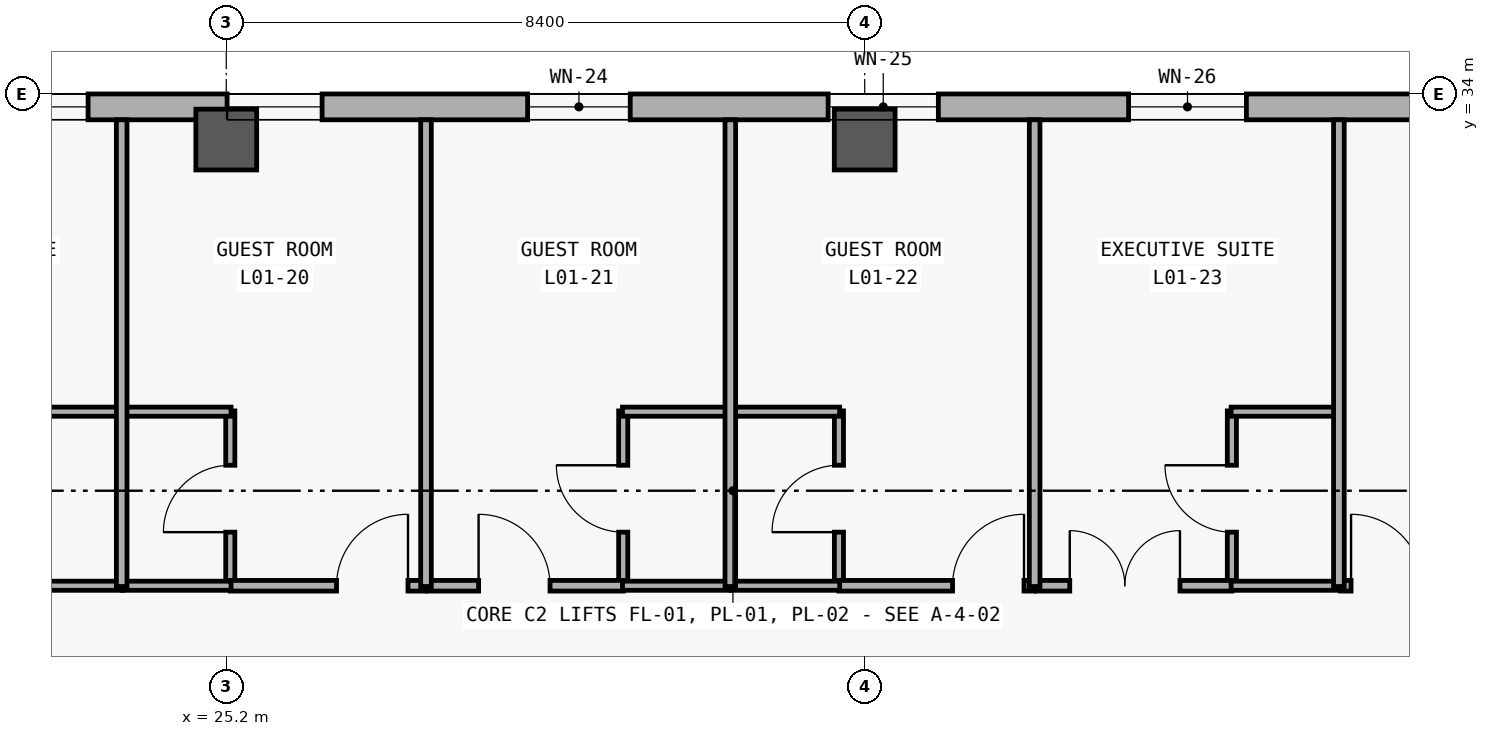
"""IFC4 building model, lengths in metres.
Left out: names, types, materials, properties, quantities, classifications, styles, units other than length and angle.
Written with IfcOpenShell. Run it as: python <this file> out.ifc"""

import sys

from ifc_helpers import new_model, si_unit, direction, frame, frame_2d, origin, origin_2d, place, context, subcontext, project, spatial, rectangle, extrude, element, fill, save


model = new_model("IFC4")
c1 = context("Model", 3, precision=1e-05, world=origin(), true_north=direction((0.0, 1.0)))
c2 = subcontext(c1, "Body", "Model", "MODEL_VIEW")
j1 = project(units=[si_unit("LENGTHUNIT", "METRE"), si_unit("PLANEANGLEUNIT", "RADIAN")], contexts=[c1])
p1 = place(None, origin())
s1 = spatial("IfcSite", under=j1, at=p1, CompositionType="ELEMENT")
p2 = place(p1, origin())
s2 = spatial("IfcBuilding", under=s1, at=p2, CompositionType="ELEMENT")
p3 = place(p2, frame((0.0, 0.0, 5.4)))
s3 = spatial("IfcBuildingStorey", under=s2, at=p3, CompositionType="ELEMENT", Elevation=5.4)
for number, where, z_axis, x_axis in (
    (1, (25.2, 33.4, 0.0), (0.0, 0.0, 1.0), (1.0, 0.0, 0.0)),
    (2, (33.6, 33.4, 0.0), (0.0, 0.0, 1.0), (1.0, 0.0, 0.0)),
):
    element("IfcColumn", number, at=place(p3, frame(where, z_axis=z_axis, x_axis=x_axis)), inside=s3, PredefinedType="COLUMN", context=c2, shape_type="SweptSolid", body=[
        extrude(rectangle(XDim=0.8, YDim=0.8, at=origin_2d()), origin(), (0.0, 0.0, 1.0), 5.4),
    ])
p4 = place(p3, frame((8.74, 33.83, 0.0), z_axis=(0.0, 0.0, 1.0), x_axis=(1.0, 0.0, 0.0)))
e3 = element("IfcWall", 3, at=p4, inside=s3, PredefinedType="SOLIDWALL", context=c2, shape_type="SweptSolid", body=[
    extrude(rectangle(XDim=83.32, YDim=0.34, at=frame_2d((41.66, 0.0))), origin(), (0.0, 0.0, 1.0), 5.1),
])
p5 = place(p4, frame((4.795, 0.0, 0.85)))
e4 = element("IfcOpeningElement", 4, at=p5, cuts=e3, PredefinedType="OPENING", context=c2, shape_type="SweptSolid", body=[
    extrude(rectangle(XDim=1.58, YDim=1.85, at=frame_2d((0.79, 0.925))), frame((0.0, 0.18, 0.0), z_axis=(0.0, -1.0, 0.0), x_axis=(1.0, 0.0, 0.0)), (0.0, 0.0, 1.0), 0.36),
])
p6 = place(p4, frame((11.542, 0.0, 0.85)))
e5 = element("IfcOpeningElement", 5, at=p6, cuts=e3, PredefinedType="OPENING", context=c2, shape_type="SweptSolid", body=[
    extrude(rectangle(XDim=3.1, YDim=2.2, at=frame_2d((1.55, 1.1))), frame((0.0, 0.18, 0.0), z_axis=(0.0, -1.0, 0.0), x_axis=(1.0, 0.0, 0.0)), (0.0, 0.0, 1.0), 0.36),
])
p7 = place(p4, frame((16.471, 0.0, 0.85)))
e6 = element("IfcOpeningElement", 6, at=p7, cuts=e3, PredefinedType="OPENING", context=c2, shape_type="SweptSolid", body=[
    extrude(rectangle(XDim=1.25, YDim=1.45, at=frame_2d((0.625, 0.725))), frame((0.0, 0.18, 0.0), z_axis=(0.0, -1.0, 0.0), x_axis=(1.0, 0.0, 0.0)), (0.0, 0.0, 1.0), 0.36),
])
p8 = place(p4, frame((20.425, 0.0, 0.85)))
e7 = element("IfcOpeningElement", 7, at=p8, cuts=e3, PredefinedType="OPENING", context=c2, shape_type="SweptSolid", body=[
    extrude(rectangle(XDim=1.35, YDim=1.55, at=frame_2d((0.675, 0.775))), frame((0.0, 0.18, 0.0), z_axis=(0.0, -1.0, 0.0), x_axis=(1.0, 0.0, 0.0)), (0.0, 0.0, 1.0), 0.36),
])
p9 = place(p4, frame((24.379, 0.0, 0.85)))
e8 = element("IfcOpeningElement", 8, at=p9, cuts=e3, PredefinedType="OPENING", context=c2, shape_type="SweptSolid", body=[
    extrude(rectangle(XDim=1.45, YDim=1.65, at=frame_2d((0.725, 0.825))), frame((0.0, 0.18, 0.0), z_axis=(0.0, -1.0, 0.0), x_axis=(1.0, 0.0, 0.0)), (0.0, 0.0, 1.0), 0.36),
])
p10 = place(p4, frame((28.332, 0.0, 0.85)))
e9 = element("IfcOpeningElement", 9, at=p10, cuts=e3, PredefinedType="OPENING", context=c2, shape_type="SweptSolid", body=[
    extrude(rectangle(XDim=1.55, YDim=1.65, at=frame_2d((0.775, 0.825))), frame((0.0, 0.18, 0.0), z_axis=(0.0, -1.0, 0.0), x_axis=(1.0, 0.0, 0.0)), (0.0, 0.0, 1.0), 0.36),
])
p11 = place(p4, frame((32.261, 0.0, 0.85)))
e10 = element("IfcOpeningElement", 10, at=p11, cuts=e3, PredefinedType="OPENING", context=c2, shape_type="SweptSolid", body=[
    extrude(rectangle(XDim=1.7, YDim=2.0, at=frame_2d((0.85, 1.0))), frame((0.0, 0.18, 0.0), z_axis=(0.0, -1.0, 0.0), x_axis=(1.0, 0.0, 0.0)), (0.0, 0.0, 1.0), 0.36),
])
p12 = place(p4, frame((35.965, 0.0, 0.85)))
e11 = element("IfcOpeningElement", 11, at=p12, cuts=e3, PredefinedType="OPENING", context=c2, shape_type="SweptSolid", body=[
    extrude(rectangle(XDim=2.3, YDim=2.05, at=frame_2d((1.15, 1.025))), frame((0.0, 0.18, 0.0), z_axis=(0.0, -1.0, 0.0), x_axis=(1.0, 0.0, 0.0)), (0.0, 0.0, 1.0), 0.36),
])
p13 = place(p4, frame((39.744, 0.0, 0.85)))
e12 = element("IfcOpeningElement", 12, at=p13, cuts=e3, PredefinedType="OPENING", context=c2, shape_type="SweptSolid", body=[
    extrude(rectangle(XDim=2.75, YDim=2.1, at=frame_2d((1.375, 1.05))), frame((0.0, 0.18, 0.0), z_axis=(0.0, -1.0, 0.0), x_axis=(1.0, 0.0, 0.0)), (0.0, 0.0, 1.0), 0.36),
])
p14 = place(p4, frame((44.533, 0.0, 0.85)))
e13 = element("IfcOpeningElement", 13, at=p14, cuts=e3, PredefinedType="OPENING", context=c2, shape_type="SweptSolid", body=[
    extrude(rectangle(XDim=1.18, YDim=1.5, at=frame_2d((0.59, 0.75))), frame((0.0, 0.18, 0.0), z_axis=(0.0, -1.0, 0.0), x_axis=(1.0, 0.0, 0.0)), (0.0, 0.0, 1.0), 0.36),
])
p15 = place(p4, frame((48.487, 0.0, 0.85)))
e14 = element("IfcOpeningElement", 14, at=p15, cuts=e3, PredefinedType="OPENING", context=c2, shape_type="SweptSolid", body=[
    extrude(rectangle(XDim=1.28, YDim=1.6, at=frame_2d((0.64, 0.8))), frame((0.0, 0.18, 0.0), z_axis=(0.0, -1.0, 0.0), x_axis=(1.0, 0.0, 0.0)), (0.0, 0.0, 1.0), 0.36),
])
p16 = place(p4, frame((52.441, 0.0, 0.85)))
e15 = element("IfcOpeningElement", 15, at=p16, cuts=e3, PredefinedType="OPENING", context=c2, shape_type="SweptSolid", body=[
    extrude(rectangle(XDim=1.38, YDim=1.7, at=frame_2d((0.69, 0.85))), frame((0.0, 0.18, 0.0), z_axis=(0.0, -1.0, 0.0), x_axis=(1.0, 0.0, 0.0)), (0.0, 0.0, 1.0), 0.36),
])
p17 = place(p4, frame((56.395, 0.0, 0.85)))
e16 = element("IfcOpeningElement", 16, at=p17, cuts=e3, PredefinedType="OPENING", context=c2, shape_type="SweptSolid", body=[
    extrude(rectangle(XDim=1.48, YDim=1.8, at=frame_2d((0.74, 0.9))), frame((0.0, 0.18, 0.0), z_axis=(0.0, -1.0, 0.0), x_axis=(1.0, 0.0, 0.0)), (0.0, 0.0, 1.0), 0.36),
])
p18 = place(p4, frame((60.349, 0.0, 0.85)))
e17 = element("IfcOpeningElement", 17, at=p18, cuts=e3, PredefinedType="OPENING", context=c2, shape_type="SweptSolid", body=[
    extrude(rectangle(XDim=1.58, YDim=1.85, at=frame_2d((0.79, 0.925))), frame((0.0, 0.18, 0.0), z_axis=(0.0, -1.0, 0.0), x_axis=(1.0, 0.0, 0.0)), (0.0, 0.0, 1.0), 0.36),
])
p19 = place(p4, frame((64.302, 0.0, 0.85)))
e18 = element("IfcOpeningElement", 18, at=p19, cuts=e3, PredefinedType="OPENING", context=c2, shape_type="SweptSolid", body=[
    extrude(rectangle(XDim=1.68, YDim=1.9, at=frame_2d((0.84, 0.95))), frame((0.0, 0.18, 0.0), z_axis=(0.0, -1.0, 0.0), x_axis=(1.0, 0.0, 0.0)), (0.0, 0.0, 1.0), 0.36),
])
p20 = place(p4, frame((68.256, 0.0, 0.85)))
e19 = element("IfcOpeningElement", 19, at=p20, cuts=e3, PredefinedType="OPENING", context=c2, shape_type="SweptSolid", body=[
    extrude(rectangle(XDim=1.78, YDim=1.95, at=frame_2d((0.89, 0.975))), frame((0.0, 0.18, 0.0), z_axis=(0.0, -1.0, 0.0), x_axis=(1.0, 0.0, 0.0)), (0.0, 0.0, 1.0), 0.36),
])
p21 = place(p4, frame((72.21, 0.0, 0.85)))
e20 = element("IfcOpeningElement", 20, at=p21, cuts=e3, PredefinedType="OPENING", context=c2, shape_type="SweptSolid", body=[
    extrude(rectangle(XDim=1.88, YDim=1.95, at=frame_2d((0.94, 0.975))), frame((0.0, 0.18, 0.0), z_axis=(0.0, -1.0, 0.0), x_axis=(1.0, 0.0, 0.0)), (0.0, 0.0, 1.0), 0.36),
])
p22 = place(p4, frame((76.129, 0.0, 0.85)))
e21 = element("IfcOpeningElement", 21, at=p22, cuts=e3, PredefinedType="OPENING", context=c2, shape_type="SweptSolid", body=[
    extrude(rectangle(XDim=2.05, YDim=1.95, at=frame_2d((1.025, 0.975))), frame((0.0, 0.18, 0.0), z_axis=(0.0, -1.0, 0.0), x_axis=(1.0, 0.0, 0.0)), (0.0, 0.0, 1.0), 0.36),
])
p23 = place(p4, frame((80.068, 0.0, 0.85)))
e22 = element("IfcOpeningElement", 22, at=p23, cuts=e3, PredefinedType="OPENING", context=c2, shape_type="SweptSolid", body=[
    extrude(rectangle(XDim=2.18, YDim=1.95, at=frame_2d((1.09, 0.975))), frame((0.0, 0.18, 0.0), z_axis=(0.0, -1.0, 0.0), x_axis=(1.0, 0.0, 0.0)), (0.0, 0.0, 1.0), 0.36),
])
p24 = place(p3, frame((25.253, 27.52, 0.0), z_axis=(0.0, 0.0, 1.0), x_axis=(0.0, 1.0, 0.0)))
e23 = element("IfcWall", 23, at=p24, inside=s3, PredefinedType="PARTITIONING", context=c2, shape_type="SweptSolid", body=[
    extrude(rectangle(XDim=2.31, YDim=0.12, at=frame_2d((1.155, 0.0))), origin(), (0.0, 0.0, 1.0), 4.18),
])
p25 = place(p24, frame((0.715, 0.0, 0.0)))
e24 = element("IfcOpeningElement", 24, at=p25, cuts=e23, PredefinedType="OPENING", context=c2, shape_type="SweptSolid", body=[
    extrude(rectangle(XDim=0.88, YDim=2.15, at=frame_2d((0.44, 1.075))), frame((0.0, 0.07, 0.0), z_axis=(0.0, -1.0, 0.0), x_axis=(1.0, 0.0, 0.0)), (0.0, 0.0, 1.0), 0.14),
])
p26 = place(p3, frame((30.423, 27.52, 0.0), z_axis=(0.0, 0.0, 1.0), x_axis=(0.0, 1.0, 0.0)))
e25 = element("IfcWall", 25, at=p26, inside=s3, PredefinedType="PARTITIONING", context=c2, shape_type="SweptSolid", body=[
    extrude(rectangle(XDim=2.31, YDim=0.12, at=frame_2d((1.155, 0.0))), origin(), (0.0, 0.0, 1.0), 4.18),
])
p27 = place(p26, frame((0.715, 0.0, 0.0)))
e26 = element("IfcOpeningElement", 26, at=p27, cuts=e25, PredefinedType="OPENING", context=c2, shape_type="SweptSolid", body=[
    extrude(rectangle(XDim=0.88, YDim=2.15, at=frame_2d((0.44, 1.075))), frame((0.0, 0.07, 0.0), z_axis=(0.0, -1.0, 0.0), x_axis=(1.0, 0.0, 0.0)), (0.0, 0.0, 1.0), 0.14),
])
p28 = place(p3, frame((33.261, 27.52, 0.0), z_axis=(0.0, 0.0, 1.0), x_axis=(0.0, 1.0, 0.0)))
e27 = element("IfcWall", 27, at=p28, inside=s3, PredefinedType="PARTITIONING", context=c2, shape_type="SweptSolid", body=[
    extrude(rectangle(XDim=2.31, YDim=0.12, at=frame_2d((1.155, 0.0))), origin(), (0.0, 0.0, 1.0), 4.18),
])
p29 = place(p28, frame((0.715, 0.0, 0.0)))
e28 = element("IfcOpeningElement", 28, at=p29, cuts=e27, PredefinedType="OPENING", context=c2, shape_type="SweptSolid", body=[
    extrude(rectangle(XDim=0.88, YDim=2.15, at=frame_2d((0.44, 1.075))), frame((0.0, 0.07, 0.0), z_axis=(0.0, -1.0, 0.0), x_axis=(1.0, 0.0, 0.0)), (0.0, 0.0, 1.0), 0.14),
])
p30 = place(p3, frame((38.431, 27.52, 0.0), z_axis=(0.0, 0.0, 1.0), x_axis=(0.0, 1.0, 0.0)))
e29 = element("IfcWall", 29, at=p30, inside=s3, PredefinedType="PARTITIONING", context=c2, shape_type="SweptSolid", body=[
    extrude(rectangle(XDim=2.31, YDim=0.12, at=frame_2d((1.155, 0.0))), origin(), (0.0, 0.0, 1.0), 4.18),
])
p31 = place(p30, frame((0.715, 0.0, 0.0)))
e30 = element("IfcOpeningElement", 30, at=p31, cuts=e29, PredefinedType="OPENING", context=c2, shape_type="SweptSolid", body=[
    extrude(rectangle(XDim=0.88, YDim=2.15, at=frame_2d((0.44, 1.075))), frame((0.0, 0.07, 0.0), z_axis=(0.0, -1.0, 0.0), x_axis=(1.0, 0.0, 0.0)), (0.0, 0.0, 1.0), 0.14),
])
p32 = place(p3, frame((25.253, 27.53, 0.0), z_axis=(0.0, 0.0, 1.0), x_axis=(1.0, 0.0, 0.0)))
e31 = element("IfcWall", 31, at=p32, inside=s3, PredefinedType="PARTITIONING", context=c2, shape_type="SweptSolid", body=[
    extrude(rectangle(XDim=2.575, YDim=0.14, at=frame_2d((1.288, 0.0))), origin(), (0.0, 0.0, 1.0), 4.18),
])
p33 = place(p32, frame((1.398, 0.0, 0.0)))
e32 = element("IfcOpeningElement", 32, at=p33, cuts=e31, PredefinedType="OPENING", context=c2, shape_type="SweptSolid", body=[
    extrude(rectangle(XDim=0.94, YDim=2.2, at=frame_2d((0.47, 1.1))), frame((0.0, 0.08, 0.0), z_axis=(0.0, -1.0, 0.0), x_axis=(1.0, 0.0, 0.0)), (0.0, 0.0, 1.0), 0.16),
])
p34 = place(p3, frame((27.848, 27.53, 0.0), z_axis=(0.0, 0.0, 1.0), x_axis=(1.0, 0.0, 0.0)))
e33 = element("IfcWall", 33, at=p34, inside=s3, PredefinedType="PARTITIONING", context=c2, shape_type="SweptSolid", body=[
    extrude(rectangle(XDim=2.575, YDim=0.14, at=frame_2d((1.288, 0.0))), origin(), (0.0, 0.0, 1.0), 4.18),
])
p35 = place(p34, frame((0.672, 0.0, 0.0)))
e34 = element("IfcOpeningElement", 34, at=p35, cuts=e33, PredefinedType="OPENING", context=c2, shape_type="SweptSolid", body=[
    extrude(rectangle(XDim=0.94, YDim=2.2, at=frame_2d((0.47, 1.1))), frame((0.0, 0.08, 0.0), z_axis=(0.0, -1.0, 0.0), x_axis=(1.0, 0.0, 0.0)), (0.0, 0.0, 1.0), 0.16),
])
p36 = place(p3, frame((33.261, 27.53, 0.0), z_axis=(0.0, 0.0, 1.0), x_axis=(1.0, 0.0, 0.0)))
e35 = element("IfcWall", 35, at=p36, inside=s3, PredefinedType="PARTITIONING", context=c2, shape_type="SweptSolid", body=[
    extrude(rectangle(XDim=2.575, YDim=0.14, at=frame_2d((1.288, 0.0))), origin(), (0.0, 0.0, 1.0), 4.18),
])
p37 = place(p36, frame((1.495, 0.0, 0.0)))
e36 = element("IfcOpeningElement", 36, at=p37, cuts=e35, PredefinedType="OPENING", context=c2, shape_type="SweptSolid", body=[
    extrude(rectangle(XDim=0.94, YDim=2.2, at=frame_2d((0.47, 1.1))), frame((0.0, 0.08, 0.0), z_axis=(0.0, -1.0, 0.0), x_axis=(1.0, 0.0, 0.0)), (0.0, 0.0, 1.0), 0.16),
])
p38 = place(p3, frame((35.856, 27.53, 0.0), z_axis=(0.0, 0.0, 1.0), x_axis=(1.0, 0.0, 0.0)))
e37 = element("IfcWall", 37, at=p38, inside=s3, PredefinedType="PARTITIONING", context=c2, shape_type="SweptSolid", body=[
    extrude(rectangle(XDim=2.575, YDim=0.14, at=frame_2d((1.288, 0.0))), origin(), (0.0, 0.0, 1.0), 4.18),
])
p39 = place(p38, frame((0.442, 0.0, 0.0)))
e38 = element("IfcOpeningElement", 38, at=p39, cuts=e37, PredefinedType="OPENING", context=c2, shape_type="SweptSolid", body=[
    extrude(rectangle(XDim=1.45, YDim=2.3, at=frame_2d((0.725, 1.15))), frame((0.0, 0.08, 0.0), z_axis=(0.0, -1.0, 0.0), x_axis=(1.0, 0.0, 0.0)), (0.0, 0.0, 1.0), 0.16),
])
p40 = place(p3, frame((39.859, 27.53, 0.0), z_axis=(0.0, 0.0, 1.0), x_axis=(1.0, 0.0, 0.0)))
e39 = element("IfcWall", 39, at=p40, inside=s3, PredefinedType="PARTITIONING", context=c2, shape_type="SweptSolid", body=[
    extrude(rectangle(XDim=2.575, YDim=0.14, at=frame_2d((1.288, 0.0))), origin(), (0.0, 0.0, 1.0), 4.18),
])
p41 = place(p40, frame((0.14, 0.0, 0.0)))
e40 = element("IfcOpeningElement", 40, at=p41, cuts=e39, PredefinedType="OPENING", context=c2, shape_type="SweptSolid", body=[
    extrude(rectangle(XDim=0.94, YDim=2.2, at=frame_2d((0.47, 1.1))), frame((0.0, 0.08, 0.0), z_axis=(0.0, -1.0, 0.0), x_axis=(1.0, 0.0, 0.0)), (0.0, 0.0, 1.0), 0.16),
])
for number, where, z_axis, x_axis in (
    (41, (22.405, 27.53, 0.0), (0.0, 0.0, 1.0), (1.0, 0.0, 0.0)),
    (42, (22.405, 29.82, 0.0), (0.0, 0.0, 1.0), (1.0, 0.0, 0.0)),
    (43, (23.834, 27.53, 0.0), (0.0, 0.0, 1.0), (1.0, 0.0, 0.0)),
    (44, (23.834, 29.82, 0.0), (0.0, 0.0, 1.0), (1.0, 0.0, 0.0)),
    (45, (30.413, 27.53, 0.0), (0.0, 0.0, 1.0), (1.0, 0.0, 0.0)),
    (46, (30.413, 29.82, 0.0), (0.0, 0.0, 1.0), (1.0, 0.0, 0.0)),
    (47, (31.842, 27.53, 0.0), (0.0, 0.0, 1.0), (1.0, 0.0, 0.0)),
    (48, (31.842, 29.82, 0.0), (0.0, 0.0, 1.0), (1.0, 0.0, 0.0)),
):
    element("IfcWall", number, at=place(p3, frame(where, z_axis=z_axis, x_axis=x_axis)), inside=s3, PredefinedType="PARTITIONING", context=c2, shape_type="SweptSolid", body=[
        extrude(rectangle(XDim=1.429, YDim=0.12, at=frame_2d((0.714, 0.0))), origin(), (0.0, 0.0, 1.0), 4.18),
    ])
for number, where, z_axis, x_axis in (
    (49, (38.421, 27.53, 0.0), (0.0, 0.0, 1.0), (1.0, 0.0, 0.0)),
    (50, (38.421, 29.82, 0.0), (0.0, 0.0, 1.0), (1.0, 0.0, 0.0)),
):
    element("IfcWall", number, at=place(p3, frame(where, z_axis=z_axis, x_axis=x_axis)), inside=s3, PredefinedType="PARTITIONING", context=c2, shape_type="SweptSolid", body=[
        extrude(rectangle(XDim=1.428, YDim=0.12, at=frame_2d((0.714, 0.0))), origin(), (0.0, 0.0, 1.0), 4.18),
    ])
for number, where, z_axis, x_axis in (
    (51, (23.824, 27.52, 0.0), (0.0, 0.0, 1.0), (0.0, 1.0, 0.0)),
    (52, (27.828, 27.52, 0.0), (0.0, 0.0, 1.0), (0.0, 1.0, 0.0)),
    (53, (31.832, 27.52, 0.0), (0.0, 0.0, 1.0), (0.0, 1.0, 0.0)),
    (54, (35.836, 27.52, 0.0), (0.0, 0.0, 1.0), (0.0, 1.0, 0.0)),
    (55, (39.839, 27.52, 0.0), (0.0, 0.0, 1.0), (0.0, 1.0, 0.0)),
):
    element("IfcWall", number, at=place(p3, frame(where, z_axis=z_axis, x_axis=x_axis)), inside=s3, PredefinedType="PARTITIONING", context=c2, shape_type="SweptSolid", body=[
        extrude(rectangle(XDim=6.14, YDim=0.14, at=frame_2d((3.07, 0.0))), origin(), (0.0, 0.0, 1.0), 4.18),
    ])
p42 = place(p6, origin())
e56 = element("IfcWindow", 56, at=p42, inside=s3, PartitioningType="SINGLE_PANEL", PredefinedType="WINDOW", context=c2, shape_type="SweptSolid", body=[
    extrude(rectangle(XDim=3.1, YDim=2.2, at=frame_2d((1.55, 1.1))), frame((0.0, 0.03, 0.0), z_axis=(0.0, -1.0, 0.0), x_axis=(1.0, 0.0, 0.0)), (0.0, 0.0, 1.0), 0.06),
])
fill(e5, e56)
p43 = place(p7, origin())
e57 = element("IfcWindow", 57, at=p43, inside=s3, PartitioningType="SINGLE_PANEL", PredefinedType="WINDOW", context=c2, shape_type="SweptSolid", body=[
    extrude(rectangle(XDim=1.25, YDim=1.45, at=frame_2d((0.625, 0.725))), frame((0.0, 0.03, 0.0), z_axis=(0.0, -1.0, 0.0), x_axis=(1.0, 0.0, 0.0)), (0.0, 0.0, 1.0), 0.06),
])
fill(e6, e57)
p44 = place(p8, origin())
e58 = element("IfcWindow", 58, at=p44, inside=s3, PartitioningType="SINGLE_PANEL", PredefinedType="WINDOW", context=c2, shape_type="SweptSolid", body=[
    extrude(rectangle(XDim=1.35, YDim=1.55, at=frame_2d((0.675, 0.775))), frame((0.0, 0.03, 0.0), z_axis=(0.0, -1.0, 0.0), x_axis=(1.0, 0.0, 0.0)), (0.0, 0.0, 1.0), 0.06),
])
fill(e7, e58)
p45 = place(p9, origin())
e59 = element("IfcWindow", 59, at=p45, inside=s3, PartitioningType="SINGLE_PANEL", PredefinedType="WINDOW", context=c2, shape_type="SweptSolid", body=[
    extrude(rectangle(XDim=1.45, YDim=1.65, at=frame_2d((0.725, 0.825))), frame((0.0, 0.03, 0.0), z_axis=(0.0, -1.0, 0.0), x_axis=(1.0, 0.0, 0.0)), (0.0, 0.0, 1.0), 0.06),
])
fill(e8, e59)
p46 = place(p10, origin())
e60 = element("IfcWindow", 60, at=p46, inside=s3, PartitioningType="SINGLE_PANEL", PredefinedType="WINDOW", context=c2, shape_type="SweptSolid", body=[
    extrude(rectangle(XDim=1.55, YDim=1.65, at=frame_2d((0.775, 0.825))), frame((0.0, 0.03, 0.0), z_axis=(0.0, -1.0, 0.0), x_axis=(1.0, 0.0, 0.0)), (0.0, 0.0, 1.0), 0.06),
])
fill(e9, e60)
p47 = place(p25, origin())
e61 = element("IfcDoor", 61, at=p47, inside=s3, OperationType="SINGLE_SWING_LEFT", PredefinedType="DOOR", context=c2, shape_type="SweptSolid", body=[
    extrude(rectangle(XDim=0.88, YDim=2.15, at=frame_2d((0.44, 1.075))), frame((0.0, 0.025, 0.0), z_axis=(0.0, -1.0, 0.0), x_axis=(1.0, 0.0, 0.0)), (0.0, 0.0, 1.0), 0.05),
])
fill(e24, e61)
p48 = place(p27, origin())
e62 = element("IfcDoor", 62, at=p48, inside=s3, OperationType="SINGLE_SWING_RIGHT", PredefinedType="DOOR", context=c2, shape_type="SweptSolid", body=[
    extrude(rectangle(XDim=0.88, YDim=2.15, at=frame_2d((0.44, 1.075))), frame((0.0, 0.025, 0.0), z_axis=(0.0, -1.0, 0.0), x_axis=(1.0, 0.0, 0.0)), (0.0, 0.0, 1.0), 0.05),
])
fill(e26, e62)
p49 = place(p29, origin())
e63 = element("IfcDoor", 63, at=p49, inside=s3, OperationType="SINGLE_SWING_LEFT", PredefinedType="DOOR", context=c2, shape_type="SweptSolid", body=[
    extrude(rectangle(XDim=0.88, YDim=2.15, at=frame_2d((0.44, 1.075))), frame((0.0, 0.025, 0.0), z_axis=(0.0, -1.0, 0.0), x_axis=(1.0, 0.0, 0.0)), (0.0, 0.0, 1.0), 0.05),
])
fill(e28, e63)
p50 = place(p31, origin())
e64 = element("IfcDoor", 64, at=p50, inside=s3, OperationType="SINGLE_SWING_RIGHT", PredefinedType="DOOR", context=c2, shape_type="SweptSolid", body=[
    extrude(rectangle(XDim=0.88, YDim=2.15, at=frame_2d((0.44, 1.075))), frame((0.0, 0.025, 0.0), z_axis=(0.0, -1.0, 0.0), x_axis=(1.0, 0.0, 0.0)), (0.0, 0.0, 1.0), 0.05),
])
fill(e30, e64)
p51 = place(p33, origin())
e65 = element("IfcDoor", 65, at=p51, inside=s3, OperationType="SINGLE_SWING_RIGHT", PredefinedType="DOOR", context=c2, shape_type="SweptSolid", body=[
    extrude(rectangle(XDim=0.94, YDim=2.2, at=frame_2d((0.47, 1.1))), frame((0.0, 0.025, 0.0), z_axis=(0.0, -1.0, 0.0), x_axis=(1.0, 0.0, 0.0)), (0.0, 0.0, 1.0), 0.05),
])
fill(e32, e65)
p52 = place(p35, origin())
e66 = element("IfcDoor", 66, at=p52, inside=s3, OperationType="SINGLE_SWING_LEFT", PredefinedType="DOOR", context=c2, shape_type="SweptSolid", body=[
    extrude(rectangle(XDim=0.94, YDim=2.2, at=frame_2d((0.47, 1.1))), frame((0.0, 0.025, 0.0), z_axis=(0.0, -1.0, 0.0), x_axis=(1.0, 0.0, 0.0)), (0.0, 0.0, 1.0), 0.05),
])
fill(e34, e66)
p53 = place(p37, origin())
e67 = element("IfcDoor", 67, at=p53, inside=s3, OperationType="SINGLE_SWING_RIGHT", PredefinedType="DOOR", context=c2, shape_type="SweptSolid", body=[
    extrude(rectangle(XDim=0.94, YDim=2.2, at=frame_2d((0.47, 1.1))), frame((0.0, 0.025, 0.0), z_axis=(0.0, -1.0, 0.0), x_axis=(1.0, 0.0, 0.0)), (0.0, 0.0, 1.0), 0.05),
])
fill(e36, e67)
p54 = place(p39, origin())
e68 = element("IfcDoor", 68, at=p54, inside=s3, OperationType="DOUBLE_DOOR_SINGLE_SWING", PredefinedType="DOOR", context=c2, shape_type="SweptSolid", body=[
    extrude(rectangle(XDim=1.45, YDim=2.3, at=frame_2d((0.725, 1.15))), frame((0.0, 0.025, 0.0), z_axis=(0.0, -1.0, 0.0), x_axis=(1.0, 0.0, 0.0)), (0.0, 0.0, 1.0), 0.05),
])
fill(e38, e68)
p55 = place(p41, origin())
e69 = element("IfcDoor", 69, at=p55, inside=s3, OperationType="SINGLE_SWING_LEFT", PredefinedType="DOOR", context=c2, shape_type="SweptSolid", body=[
    extrude(rectangle(XDim=0.94, YDim=2.2, at=frame_2d((0.47, 1.1))), frame((0.0, 0.025, 0.0), z_axis=(0.0, -1.0, 0.0), x_axis=(1.0, 0.0, 0.0)), (0.0, 0.0, 1.0), 0.05),
])
fill(e40, e69)
save(model, sys.argv[1])
